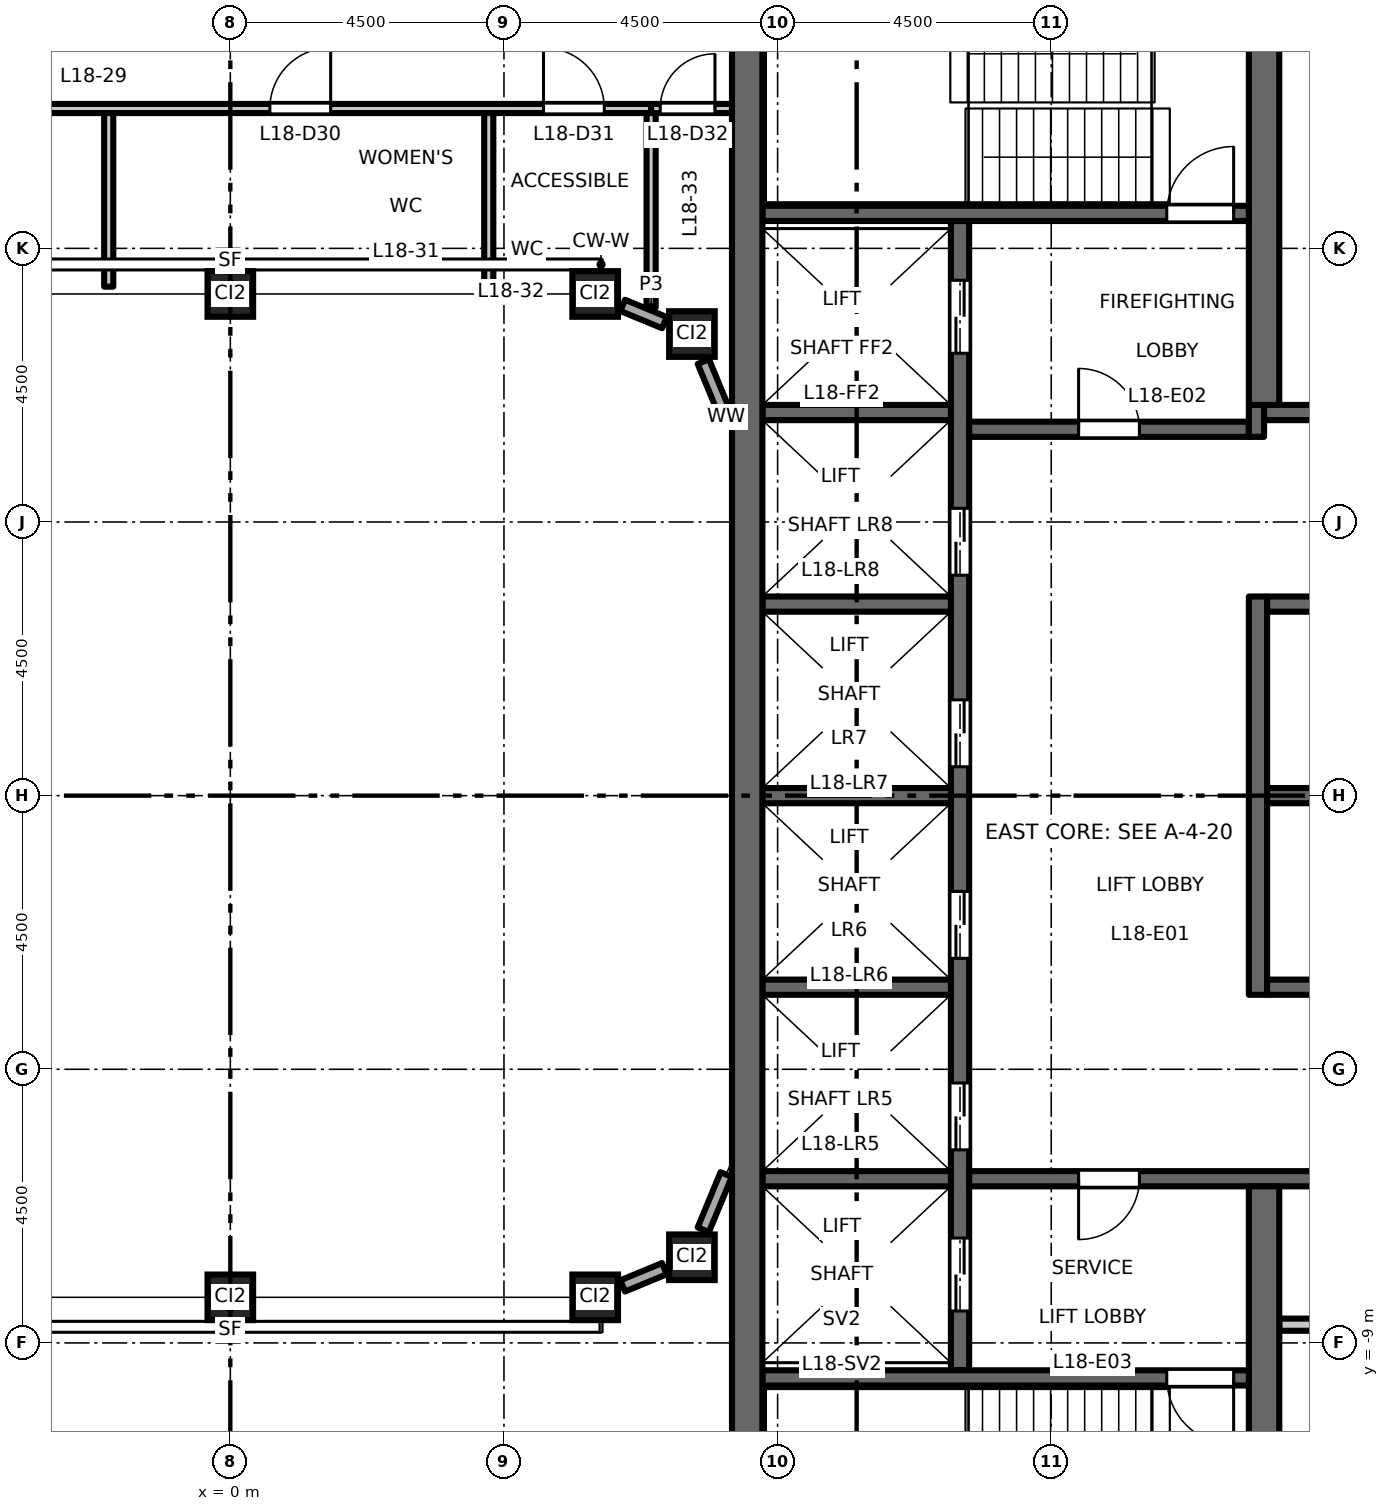
"""IFC4 building model, lengths in metres.
Left out: names, types, materials, properties, quantities, classifications, styles, units other than length and angle.
Written with IfcOpenShell. Run it as: python <this file> out.ifc"""

import sys

from ifc_helpers import new_model, si_unit, direction, frame, frame_2d, origin, origin_2d, place, context, subcontext, project, spatial, rectangle, hollow_rectangle, extrude, element, fill, save


model = new_model("IFC4")
c1 = context("Model", 3, precision=1e-05, world=origin(), true_north=direction((0.0, 1.0)))
c2 = subcontext(c1, "Body", "Model", "MODEL_VIEW")
j1 = project(units=[si_unit("LENGTHUNIT", "METRE"), si_unit("PLANEANGLEUNIT", "RADIAN")], contexts=[c1])
p1 = place(None, origin())
s1 = spatial("IfcSite", under=j1, at=p1, CompositionType="ELEMENT")
p2 = place(p1, origin())
s2 = spatial("IfcBuilding", under=s1, at=p2, CompositionType="ELEMENT")
p3 = place(p2, frame((0.0, 0.0, 85.2)))
s3 = spatial("IfcBuildingStorey", under=s2, at=p3, CompositionType="ELEMENT", Elevation=85.2)
for number, where, z_axis, x_axis in (
    (1, (0.0, -8.25, 0.0), (0.0, 0.0, 1.0), (1.0, 0.0, 0.0)),
    (2, (6.0, -8.25, 0.0), (0.0, 0.0, 1.0), (1.0, 0.0, 0.0)),
    (3, (7.591, -7.591, 0.0), (0.0, 0.0, 1.0), (1.0, 0.0, 0.0)),
    (4, (0.0, 8.25, 0.0), (0.0, 0.0, 1.0), (1.0, 0.0, 0.0)),
    (5, (6.0, 8.25, 0.0), (0.0, 0.0, 1.0), (1.0, 0.0, 0.0)),
    (6, (7.591, 7.591, 0.0), (0.0, 0.0, 1.0), (1.0, 0.0, 0.0)),
):
    element("IfcColumn", number, at=place(p3, frame(where, z_axis=z_axis, x_axis=x_axis)), inside=s3, PredefinedType="COLUMN", context=c2, shape_type="SweptSolid", body=[
        extrude(hollow_rectangle(XDim=0.75, YDim=0.75, WallThickness=0.045, at=origin_2d()), origin(), (0.0, 0.0, 1.0), 4.5),
    ])
p4 = place(p3, frame((12.0, -9.45, 0.0), z_axis=(0.0, 0.0, 1.0), x_axis=(0.0, 1.0, 0.0)))
e7 = element("IfcWall", 7, at=p4, inside=s3, PredefinedType="SHEAR", context=c2, shape_type="SweptSolid", body=[
    extrude(rectangle(XDim=18.9, YDim=0.3, at=frame_2d((9.45, 0.0))), origin(), (0.0, 0.0, 1.0), 4.35),
])
p5 = place(p4, frame((3.625, 0.0, 0.0)))
e8 = element("IfcOpeningElement", 8, at=p5, cuts=e7, PredefinedType="OPENING", context=c2, shape_type="SweptSolid", body=[
    extrude(rectangle(XDim=1.1, YDim=2.1, at=frame_2d((0.55, 1.05))), frame((0.0, 0.16, 0.0), z_axis=(0.0, -1.0, 0.0), x_axis=(1.0, 0.0, 0.0)), (0.0, 0.0, 1.0), 0.32),
])
p6 = place(p4, frame((6.775, 0.0, 0.0)))
e9 = element("IfcOpeningElement", 9, at=p6, cuts=e7, PredefinedType="OPENING", context=c2, shape_type="SweptSolid", body=[
    extrude(rectangle(XDim=1.1, YDim=2.1, at=frame_2d((0.55, 1.05))), frame((0.0, 0.16, 0.0), z_axis=(0.0, -1.0, 0.0), x_axis=(1.0, 0.0, 0.0)), (0.0, 0.0, 1.0), 0.32),
])
p7 = place(p4, frame((9.925, 0.0, 0.0)))
e10 = element("IfcOpeningElement", 10, at=p7, cuts=e7, PredefinedType="OPENING", context=c2, shape_type="SweptSolid", body=[
    extrude(rectangle(XDim=1.1, YDim=2.1, at=frame_2d((0.55, 1.05))), frame((0.0, 0.16, 0.0), z_axis=(0.0, -1.0, 0.0), x_axis=(1.0, 0.0, 0.0)), (0.0, 0.0, 1.0), 0.32),
])
p8 = place(p4, frame((13.075, 0.0, 0.0)))
e11 = element("IfcOpeningElement", 11, at=p8, cuts=e7, PredefinedType="OPENING", context=c2, shape_type="SweptSolid", body=[
    extrude(rectangle(XDim=1.1, YDim=2.1, at=frame_2d((0.55, 1.05))), frame((0.0, 0.16, 0.0), z_axis=(0.0, -1.0, 0.0), x_axis=(1.0, 0.0, 0.0)), (0.0, 0.0, 1.0), 0.32),
])
p9 = place(p4, frame((16.725, 0.0, 0.0)))
e12 = element("IfcOpeningElement", 12, at=p9, cuts=e7, PredefinedType="OPENING", context=c2, shape_type="SweptSolid", body=[
    extrude(rectangle(XDim=1.2, YDim=2.1, at=frame_2d((0.6, 1.05))), frame((0.0, 0.16, 0.0), z_axis=(0.0, -1.0, 0.0), x_axis=(1.0, 0.0, 0.0)), (0.0, 0.0, 1.0), 0.32),
])
p10 = place(p4, frame((0.975, 0.0, 0.0)))
e13 = element("IfcOpeningElement", 13, at=p10, cuts=e7, PredefinedType="OPENING", context=c2, shape_type="SweptSolid", body=[
    extrude(rectangle(XDim=1.2, YDim=2.1, at=frame_2d((0.6, 1.05))), frame((0.0, 0.16, 0.0), z_axis=(0.0, -1.0, 0.0), x_axis=(1.0, 0.0, 0.0)), (0.0, 0.0, 1.0), 0.32),
])
p11 = place(p3, frame((12.15, 6.025, 0.0), z_axis=(0.0, 0.0, 1.0), x_axis=(1.0, 0.0, 0.0)))
e14 = element("IfcWall", 14, at=p11, inside=s3, PredefinedType="SHEAR", context=c2, shape_type="SweptSolid", body=[
    extrude(rectangle(XDim=4.6, YDim=0.25, at=frame_2d((2.3, 0.0))), origin(), (0.0, 0.0, 1.0), 4.35),
])
p12 = place(p11, frame((1.8, 0.0, 0.0)))
e15 = element("IfcOpeningElement", 15, at=p12, cuts=e14, PredefinedType="OPENING", context=c2, shape_type="SweptSolid", body=[
    extrude(rectangle(XDim=1.0, YDim=2.1, at=frame_2d((0.5, 1.05))), frame((0.0, 0.135, 0.0), z_axis=(0.0, -1.0, 0.0), x_axis=(1.0, 0.0, 0.0)), (0.0, 0.0, 1.0), 0.27),
])
p13 = place(p3, frame((16.875, 5.9, 0.0), z_axis=(0.0, 0.0, 1.0), x_axis=(0.0, 1.0, 0.0)))
e16 = element("IfcWall", 16, at=p13, inside=s3, PredefinedType="SHEAR", context=c2, shape_type="SweptSolid", body=[
    extrude(rectangle(XDim=0.525, YDim=0.25, at=frame_2d((0.263, 0.0))), origin(), (0.0, 0.0, 1.0), 4.35),
])
p14 = place(p3, frame((17.0, 6.3, 0.0), z_axis=(0.0, 0.0, 1.0), x_axis=(1.0, 0.0, 0.0)))
e17 = element("IfcWall", 17, at=p14, inside=s3, PredefinedType="SHEAR", context=c2, shape_type="SweptSolid", body=[
    extrude(rectangle(XDim=4.25, YDim=0.25, at=frame_2d((2.125, 0.0))), origin(), (0.0, 0.0, 1.0), 4.35),
])
p15 = place(p3, frame((12.15, -6.3, 0.0), z_axis=(0.0, 0.0, 1.0), x_axis=(1.0, 0.0, 0.0)))
e18 = element("IfcWall", 18, at=p15, inside=s3, PredefinedType="SHEAR", context=c2, shape_type="SweptSolid", body=[
    extrude(rectangle(XDim=9.1, YDim=0.25, at=frame_2d((4.55, 0.0))), origin(), (0.0, 0.0, 1.0), 4.35),
])
p16 = place(p15, frame((1.8, 0.0, 0.0)))
e19 = element("IfcOpeningElement", 19, at=p16, cuts=e18, PredefinedType="OPENING", context=c2, shape_type="SweptSolid", body=[
    extrude(rectangle(XDim=1.0, YDim=2.1, at=frame_2d((0.5, 1.05))), frame((0.0, 0.135, 0.0), z_axis=(0.0, -1.0, 0.0), x_axis=(1.0, 0.0, 0.0)), (0.0, 0.0, 1.0), 0.27),
])
p17 = place(p15, frame((6.15, 0.0, 0.0)))
e20 = element("IfcOpeningElement", 20, at=p17, cuts=e18, PredefinedType="OPENING", context=c2, shape_type="SweptSolid", body=[
    extrude(rectangle(XDim=0.9, YDim=2.1, at=frame_2d((0.45, 1.05))), frame((0.0, 0.135, 0.0), z_axis=(0.0, -1.0, 0.0), x_axis=(1.0, 0.0, 0.0)), (0.0, 0.0, 1.0), 0.27),
])
p18 = place(p3, frame((17.25, -8.7, 0.0), z_axis=(0.0, 0.0, 1.0), x_axis=(1.0, 0.0, 0.0)))
e21 = element("IfcWall", 21, at=p18, inside=s3, PredefinedType="PARTITIONING", context=c2, shape_type="SweptSolid", body=[
    extrude(rectangle(XDim=4.0, YDim=0.2, at=frame_2d((2.0, 0.0))), origin(), (0.0, 0.0, 1.0), 4.35),
])
p19 = place(p3, frame((16.9, -3.275, 0.0), z_axis=(0.0, 0.0, 1.0), x_axis=(0.0, 1.0, 0.0)))
e22 = element("IfcWall", 22, at=p19, inside=s3, PredefinedType="SHEAR", context=c2, shape_type="SweptSolid", body=[
    extrude(rectangle(XDim=6.55, YDim=0.3, at=frame_2d((3.275, 0.0))), origin(), (0.0, 0.0, 1.0), 4.35),
])
for number, where, z_axis, x_axis in (
    (23, (17.05, 0.0, 0.0), (0.0, 0.0, 1.0), (1.0, 0.0, 0.0)),
    (24, (17.05, 3.15, 0.0), (0.0, 0.0, 1.0), (1.0, 0.0, 0.0)),
    (25, (17.05, -3.15, 0.0), (0.0, 0.0, 1.0), (1.0, 0.0, 0.0)),
):
    element("IfcWall", number, at=place(p3, frame(where, z_axis=z_axis, x_axis=x_axis)), inside=s3, PredefinedType="SHEAR", context=c2, shape_type="SweptSolid", body=[
        extrude(rectangle(XDim=4.2, YDim=0.25, at=frame_2d((2.1, 0.0))), origin(), (0.0, 0.0, 1.0), 4.35),
    ])
for number, where, z_axis, x_axis in (
    (26, (17.0, 6.425, 0.0), (0.0, 0.0, 1.0), (0.0, 1.0, 0.0)),
    (27, (17.0, -13.0, 0.0), (0.0, 0.0, 1.0), (0.0, 1.0, 0.0)),
):
    element("IfcWall", number, at=place(p3, frame(where, z_axis=z_axis, x_axis=x_axis)), inside=s3, PredefinedType="SHEAR", context=c2, shape_type="SweptSolid", body=[
        extrude(rectangle(XDim=6.575, YDim=0.5, at=frame_2d((3.288, 0.0))), origin(), (0.0, 0.0, 1.0), 4.35),
    ])
for number, where, z_axis, x_axis in (
    (28, (8.75, 0.0, 0.0), (0.0, 0.0, 1.0), (1.0, 0.0, 0.0)),
    (29, (8.75, 3.15, 0.0), (0.0, 0.0, 1.0), (1.0, 0.0, 0.0)),
    (30, (8.75, 6.3, 0.0), (0.0, 0.0, 1.0), (1.0, 0.0, 0.0)),
    (31, (8.75, -3.15, 0.0), (0.0, 0.0, 1.0), (1.0, 0.0, 0.0)),
    (32, (8.75, -6.3, 0.0), (0.0, 0.0, 1.0), (1.0, 0.0, 0.0)),
):
    element("IfcWall", number, at=place(p3, frame(where, z_axis=z_axis, x_axis=x_axis)), inside=s3, PredefinedType="SHEAR", context=c2, shape_type="SweptSolid", body=[
        extrude(rectangle(XDim=3.1, YDim=0.25, at=frame_2d((1.55, 0.0))), origin(), (0.0, 0.0, 1.0), 4.35),
    ])
p20 = place(p3, frame((8.75, 9.575, 0.0), z_axis=(0.0, 0.0, 1.0), x_axis=(1.0, 0.0, 0.0)))
e33 = element("IfcWall", 33, at=p20, inside=s3, PredefinedType="SHEAR", context=c2, shape_type="SweptSolid", body=[
    extrude(rectangle(XDim=8.0, YDim=0.25, at=frame_2d((4.0, 0.0))), origin(), (0.0, 0.0, 1.0), 4.35),
])
p21 = place(p20, frame((6.65, 0.0, 0.0)))
e34 = element("IfcOpeningElement", 34, at=p21, cuts=e33, PredefinedType="OPENING", context=c2, shape_type="SweptSolid", body=[
    extrude(rectangle(XDim=1.1, YDim=2.1, at=frame_2d((0.55, 1.05))), frame((0.0, 0.135, 0.0), z_axis=(0.0, -1.0, 0.0), x_axis=(1.0, 0.0, 0.0)), (0.0, 0.0, 1.0), 0.27),
])
p22 = place(p3, frame((8.75, -9.575, 0.0), z_axis=(0.0, 0.0, 1.0), x_axis=(1.0, 0.0, 0.0)))
e35 = element("IfcWall", 35, at=p22, inside=s3, PredefinedType="SHEAR", context=c2, shape_type="SweptSolid", body=[
    extrude(rectangle(XDim=8.0, YDim=0.25, at=frame_2d((4.0, 0.0))), origin(), (0.0, 0.0, 1.0), 4.35),
])
p23 = place(p22, frame((6.65, 0.0, 0.0)))
e36 = element("IfcOpeningElement", 36, at=p23, cuts=e35, PredefinedType="OPENING", context=c2, shape_type="SweptSolid", body=[
    extrude(rectangle(XDim=1.1, YDim=2.1, at=frame_2d((0.55, 1.05))), frame((0.0, 0.135, 0.0), z_axis=(0.0, -1.0, 0.0), x_axis=(1.0, 0.0, 0.0)), (0.0, 0.0, 1.0), 0.27),
])
p24 = place(p3, frame((8.5, -13.0, 0.0), z_axis=(0.0, 0.0, 1.0), x_axis=(0.0, 1.0, 0.0)))
e37 = element("IfcWall", 37, at=p24, inside=s3, PredefinedType="SHEAR", context=c2, shape_type="SweptSolid", body=[
    extrude(rectangle(XDim=26.0, YDim=0.5, at=frame_2d((13.0, 0.0))), origin(), (0.0, 0.0, 1.0), 4.35),
])
p25 = place(p3, frame((6.453, -8.062, 0.0), z_axis=(0.0, 0.0, 1.0), x_axis=(0.923940677943, 0.382535780864, 0.0)))
e38 = element("IfcWall", 38, at=p25, inside=s3, PredefinedType="STANDARD", context=c2, shape_type="SweptSolid", body=[
    extrude(rectangle(XDim=0.742, YDim=0.2, at=frame_2d((0.371, 0.0))), origin(), (0.0, 0.0, 1.0), 3.73),
])
for number, where, z_axis, x_axis in (
    (39, (7.779, -7.138, 0.0), (0.0, 0.0, 1.0), (0.383, 0.924, 0.0)),
    (40, (8.154, 6.231, 0.0), (0.0, 0.0, 1.0), (-0.383, 0.924, 0.0)),
):
    element("IfcWall", number, at=place(p3, frame(where, z_axis=z_axis, x_axis=x_axis)), inside=s3, PredefinedType="STANDARD", context=c2, shape_type="SweptSolid", body=[
        extrude(rectangle(XDim=0.982, YDim=0.2, at=frame_2d((0.491, 0.0))), origin(), (0.0, 0.0, 1.0), 3.73),
    ])
p26 = place(p3, frame((7.138, 7.779, 0.0), z_axis=(0.0, 0.0, 1.0), x_axis=(-0.923940677943, 0.382535780864, 0.0)))
e41 = element("IfcWall", 41, at=p26, inside=s3, PredefinedType="STANDARD", context=c2, shape_type="SweptSolid", body=[
    extrude(rectangle(XDim=0.742, YDim=0.2, at=frame_2d((0.371, 0.0))), origin(), (0.0, 0.0, 1.0), 3.73),
])
p27 = place(p3, frame((-8.25, 11.3, 0.0), z_axis=(0.0, 0.0, 1.0), x_axis=(1.0, 0.0, 0.0)))
e42 = element("IfcWall", 42, at=p27, inside=s3, PredefinedType="PARTITIONING", context=c2, shape_type="SweptSolid", body=[
    extrude(rectangle(XDim=15.17, YDim=0.15, at=frame_2d((7.585, 0.0))), origin(), (0.0, 0.0, 1.0), 4.35),
])
p28 = place(p27, frame((2.65, 0.0, 0.0)))
e43 = element("IfcOpeningElement", 43, at=p28, cuts=e42, PredefinedType="OPENING", context=c2, shape_type="SweptSolid", body=[
    extrude(rectangle(XDim=1.0, YDim=2.1, at=frame_2d((0.5, 1.05))), frame((0.0, 0.085, 0.0), z_axis=(0.0, -1.0, 0.0), x_axis=(1.0, 0.0, 0.0)), (0.0, 0.0, 1.0), 0.17),
])
p29 = place(p27, frame((8.9, 0.0, 0.0)))
e44 = element("IfcOpeningElement", 44, at=p29, cuts=e42, PredefinedType="OPENING", context=c2, shape_type="SweptSolid", body=[
    extrude(rectangle(XDim=1.0, YDim=2.1, at=frame_2d((0.5, 1.05))), frame((0.0, 0.085, 0.0), z_axis=(0.0, -1.0, 0.0), x_axis=(1.0, 0.0, 0.0)), (0.0, 0.0, 1.0), 0.17),
])
p30 = place(p27, frame((13.4, 0.0, 0.0)))
e45 = element("IfcOpeningElement", 45, at=p30, cuts=e42, PredefinedType="OPENING", context=c2, shape_type="SweptSolid", body=[
    extrude(rectangle(XDim=1.0, YDim=2.1, at=frame_2d((0.5, 1.05))), frame((0.0, 0.085, 0.0), z_axis=(0.0, -1.0, 0.0), x_axis=(1.0, 0.0, 0.0)), (0.0, 0.0, 1.0), 0.17),
])
p31 = place(p3, frame((6.92, 11.3, 0.0), z_axis=(0.0, 0.0, 1.0), x_axis=(1.0, 0.0, 0.0)))
e46 = element("IfcWall", 46, at=p31, inside=s3, PredefinedType="PARTITIONING", context=c2, shape_type="SweptSolid", body=[
    extrude(rectangle(XDim=1.33, YDim=0.15, at=frame_2d((0.665, 0.0))), origin(), (0.0, 0.0, 1.0), 4.35),
])
p32 = place(p31, frame((0.15, 0.0, 0.0)))
e47 = element("IfcOpeningElement", 47, at=p32, cuts=e46, PredefinedType="OPENING", context=c2, shape_type="SweptSolid", body=[
    extrude(rectangle(XDim=0.9, YDim=2.1, at=frame_2d((0.45, 1.05))), frame((0.0, 0.085, 0.0), z_axis=(0.0, -1.0, 0.0), x_axis=(1.0, 0.0, 0.0)), (0.0, 0.0, 1.0), 0.17),
])
for number, where, z_axis, x_axis in (
    (48, (-2.0, 8.37, 0.0), (0.0, 0.0, 1.0), (0.0, 1.0, 0.0)),
    (49, (4.25, 8.37, 0.0), (0.0, 0.0, 1.0), (0.0, 1.0, 0.0)),
):
    element("IfcWall", number, at=place(p3, frame(where, z_axis=z_axis, x_axis=x_axis)), inside=s3, PredefinedType="PARTITIONING", context=c2, shape_type="SweptSolid", body=[
        extrude(rectangle(XDim=2.855, YDim=0.15, at=frame_2d((1.427, 0.0))), origin(), (0.0, 0.0, 1.0), 4.35),
    ])
p33 = place(p3, frame((6.92, 8.028, 0.0), z_axis=(0.0, 0.0, 1.0), x_axis=(0.0, 1.0, 0.0)))
e50 = element("IfcWall", 50, at=p33, inside=s3, PredefinedType="PARTITIONING", context=c2, shape_type="SweptSolid", body=[
    extrude(rectangle(XDim=3.197, YDim=0.15, at=frame_2d((1.599, 0.0))), origin(), (0.0, 0.0, 1.0), 4.35),
])
p34 = place(p12, origin())
e51 = element("IfcDoor", 51, at=p34, inside=s3, OperationType="SINGLE_SWING_RIGHT", PredefinedType="DOOR", context=c2, shape_type="SweptSolid", body=[
    extrude(rectangle(XDim=1.0, YDim=2.1, at=frame_2d((0.5, 1.05))), frame((0.0, 0.025, 0.0), z_axis=(0.0, -1.0, 0.0), x_axis=(1.0, 0.0, 0.0)), (0.0, 0.0, 1.0), 0.05),
])
fill(e15, e51)
p35 = place(p16, origin())
e52 = element("IfcDoor", 52, at=p35, inside=s3, OperationType="SINGLE_SWING_LEFT", PredefinedType="DOOR", context=c2, shape_type="SweptSolid", body=[
    extrude(rectangle(XDim=1.0, YDim=2.1, at=frame_2d((0.5, 1.05))), frame((0.0, 0.025, 0.0), z_axis=(0.0, -1.0, 0.0), x_axis=(1.0, 0.0, 0.0)), (0.0, 0.0, 1.0), 0.05),
])
fill(e19, e52)
p36 = place(p21, origin())
e53 = element("IfcDoor", 53, at=p36, inside=s3, OperationType="SINGLE_SWING_LEFT", PredefinedType="DOOR", context=c2, shape_type="SweptSolid", body=[
    extrude(rectangle(XDim=1.1, YDim=2.1, at=frame_2d((0.55, 1.05))), frame((0.0, 0.025, 0.0), z_axis=(0.0, -1.0, 0.0), x_axis=(1.0, 0.0, 0.0)), (0.0, 0.0, 1.0), 0.05),
])
fill(e34, e53)
p37 = place(p23, origin())
e54 = element("IfcDoor", 54, at=p37, inside=s3, OperationType="SINGLE_SWING_RIGHT", PredefinedType="DOOR", context=c2, shape_type="SweptSolid", body=[
    extrude(rectangle(XDim=1.1, YDim=2.1, at=frame_2d((0.55, 1.05))), frame((0.0, 0.025, 0.0), z_axis=(0.0, -1.0, 0.0), x_axis=(1.0, 0.0, 0.0)), (0.0, 0.0, 1.0), 0.05),
])
fill(e36, e54)
p38 = place(p5, origin())
e55 = element("IfcDoor", 55, at=p38, inside=s3, OperationType="DOUBLE_DOOR_SLIDING", PredefinedType="DOOR", context=c2, shape_type="SweptSolid", body=[
    extrude(rectangle(XDim=1.1, YDim=2.1, at=frame_2d((0.55, 1.05))), frame((0.0, 0.025, 0.0), z_axis=(0.0, -1.0, 0.0), x_axis=(1.0, 0.0, 0.0)), (0.0, 0.0, 1.0), 0.05),
])
fill(e8, e55)
p39 = place(p6, origin())
e56 = element("IfcDoor", 56, at=p39, inside=s3, OperationType="DOUBLE_DOOR_SLIDING", PredefinedType="DOOR", context=c2, shape_type="SweptSolid", body=[
    extrude(rectangle(XDim=1.1, YDim=2.1, at=frame_2d((0.55, 1.05))), frame((0.0, 0.025, 0.0), z_axis=(0.0, -1.0, 0.0), x_axis=(1.0, 0.0, 0.0)), (0.0, 0.0, 1.0), 0.05),
])
fill(e9, e56)
p40 = place(p7, origin())
e57 = element("IfcDoor", 57, at=p40, inside=s3, OperationType="DOUBLE_DOOR_SLIDING", PredefinedType="DOOR", context=c2, shape_type="SweptSolid", body=[
    extrude(rectangle(XDim=1.1, YDim=2.1, at=frame_2d((0.55, 1.05))), frame((0.0, 0.025, 0.0), z_axis=(0.0, -1.0, 0.0), x_axis=(1.0, 0.0, 0.0)), (0.0, 0.0, 1.0), 0.05),
])
fill(e10, e57)
p41 = place(p8, origin())
e58 = element("IfcDoor", 58, at=p41, inside=s3, OperationType="DOUBLE_DOOR_SLIDING", PredefinedType="DOOR", context=c2, shape_type="SweptSolid", body=[
    extrude(rectangle(XDim=1.1, YDim=2.1, at=frame_2d((0.55, 1.05))), frame((0.0, 0.025, 0.0), z_axis=(0.0, -1.0, 0.0), x_axis=(1.0, 0.0, 0.0)), (0.0, 0.0, 1.0), 0.05),
])
fill(e11, e58)
p42 = place(p9, origin())
e59 = element("IfcDoor", 59, at=p42, inside=s3, OperationType="DOUBLE_DOOR_SLIDING", PredefinedType="DOOR", context=c2, shape_type="SweptSolid", body=[
    extrude(rectangle(XDim=1.2, YDim=2.1, at=frame_2d((0.6, 1.05))), frame((0.0, 0.025, 0.0), z_axis=(0.0, -1.0, 0.0), x_axis=(1.0, 0.0, 0.0)), (0.0, 0.0, 1.0), 0.05),
])
fill(e12, e59)
p43 = place(p10, origin())
e60 = element("IfcDoor", 60, at=p43, inside=s3, OperationType="DOUBLE_DOOR_SLIDING", PredefinedType="DOOR", context=c2, shape_type="SweptSolid", body=[
    extrude(rectangle(XDim=1.2, YDim=2.1, at=frame_2d((0.6, 1.05))), frame((0.0, 0.025, 0.0), z_axis=(0.0, -1.0, 0.0), x_axis=(1.0, 0.0, 0.0)), (0.0, 0.0, 1.0), 0.05),
])
fill(e13, e60)
p44 = place(p29, origin())
e61 = element("IfcDoor", 61, at=p44, inside=s3, OperationType="SINGLE_SWING_RIGHT", PredefinedType="DOOR", context=c2, shape_type="SweptSolid", body=[
    extrude(rectangle(XDim=1.0, YDim=2.1, at=frame_2d((0.5, 1.05))), frame((0.0, 0.025, 0.0), z_axis=(0.0, -1.0, 0.0), x_axis=(1.0, 0.0, 0.0)), (0.0, 0.0, 1.0), 0.05),
])
fill(e44, e61)
p45 = place(p30, origin())
e62 = element("IfcDoor", 62, at=p45, inside=s3, OperationType="SINGLE_SWING_LEFT", PredefinedType="DOOR", context=c2, shape_type="SweptSolid", body=[
    extrude(rectangle(XDim=1.0, YDim=2.1, at=frame_2d((0.5, 1.05))), frame((0.0, 0.025, 0.0), z_axis=(0.0, -1.0, 0.0), x_axis=(1.0, 0.0, 0.0)), (0.0, 0.0, 1.0), 0.05),
])
fill(e45, e62)
p46 = place(p32, origin())
e63 = element("IfcDoor", 63, at=p46, inside=s3, OperationType="SINGLE_SWING_RIGHT", PredefinedType="DOOR", context=c2, shape_type="SweptSolid", body=[
    extrude(rectangle(XDim=0.9, YDim=2.1, at=frame_2d((0.45, 1.05))), frame((0.0, 0.025, 0.0), z_axis=(0.0, -1.0, 0.0), x_axis=(1.0, 0.0, 0.0)), (0.0, 0.0, 1.0), 0.05),
])
fill(e47, e63)
save(model, sys.argv[1])
